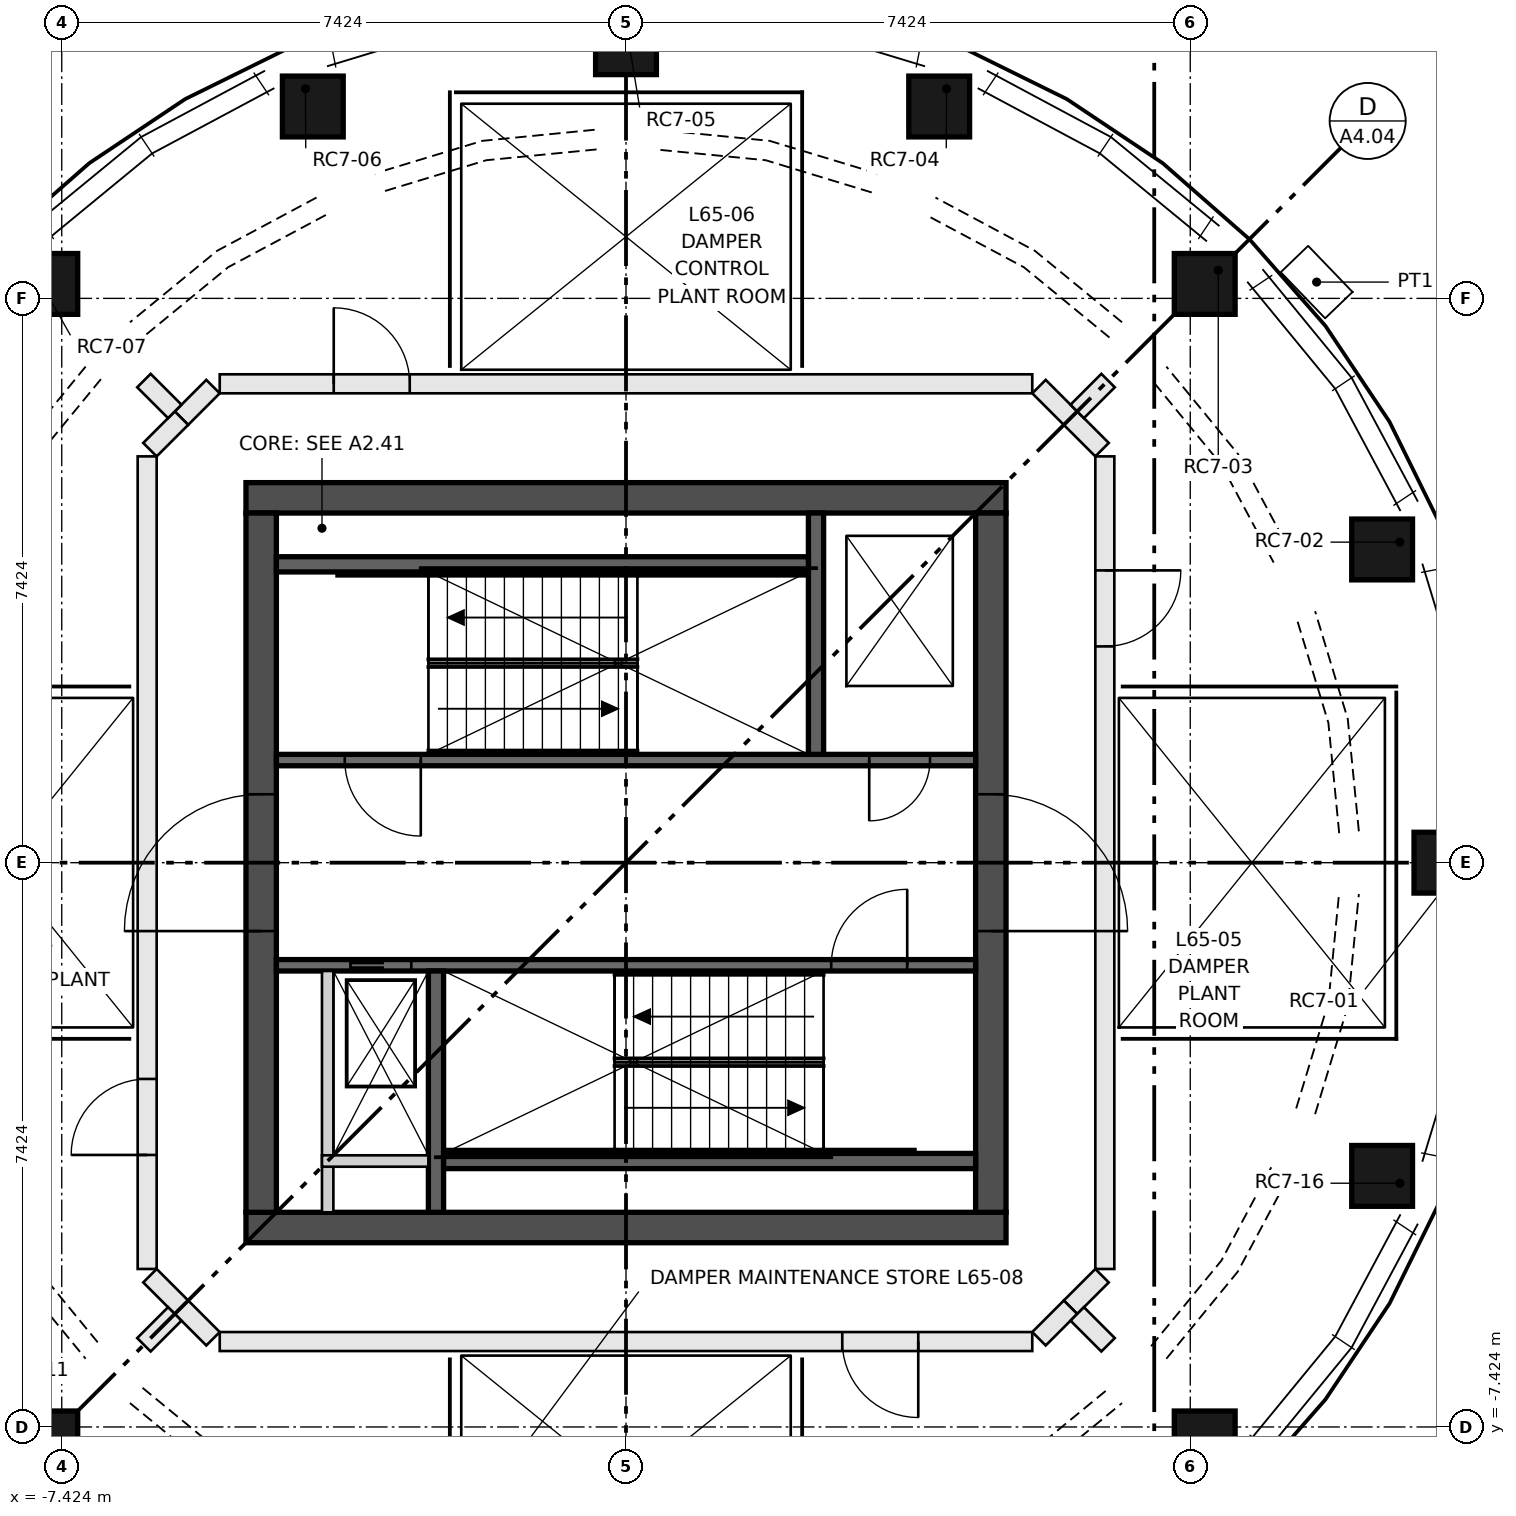
"""IFC4 building model, lengths in metres.
Left out: names, types, materials, properties, quantities, classifications, styles, units other than length and angle.
Written with IfcOpenShell. Run it as: python <this file> out.ifc"""

import sys

from ifc_helpers import new_model, si_unit, direction, frame, frame_2d, origin, origin_2d, place, context, subcontext, project, spatial, rectangle, extrude, element, fill, save


model = new_model("IFC4")
c1 = context("Model", 3, precision=1e-05, world=origin(), true_north=direction((0.0, 1.0)))
c2 = subcontext(c1, "Body", "Model", "MODEL_VIEW")
j1 = project(units=[si_unit("LENGTHUNIT", "METRE"), si_unit("PLANEANGLEUNIT", "RADIAN")], contexts=[c1])
p1 = place(None, origin())
s1 = spatial("IfcSite", under=j1, at=p1, CompositionType="ELEMENT")
p2 = place(p1, origin())
s2 = spatial("IfcBuilding", under=s1, at=p2, CompositionType="ELEMENT")
p3 = place(p2, frame((0.0, 0.0, 239.4)))
s3 = spatial("IfcBuildingStorey", under=s2, at=p3, CompositionType="ELEMENT", Elevation=239.4)
p4 = place(p3, frame((11.02, 0.0, 0.5), z_axis=(0.0, 0.0, 1.0), x_axis=(0.0, -1.0, 0.0)))
e1 = element("IfcColumn", 1, at=p4, inside=s3, PredefinedType="COLUMN", context=c2, shape_type="SweptSolid", body=[
    extrude(rectangle(XDim=0.8, YDim=0.8, at=origin_2d()), origin(), (0.0, -0.339, 0.941), 4.251),
])
p5 = place(p3, frame((10.181, 4.217, 0.5), z_axis=(0.0, 0.0, 1.0), x_axis=(0.382820947077, -0.923822560062, 0.0)))
e2 = element("IfcColumn", 2, at=p5, inside=s3, PredefinedType="COLUMN", context=c2, shape_type="SweptSolid", body=[
    extrude(rectangle(XDim=0.8, YDim=0.8, at=origin_2d()), origin(), (0.0, -0.339, 0.941), 4.251),
])
p6 = place(p3, frame((7.792, 7.792, 0.5), z_axis=(0.0, 0.0, 1.0), x_axis=(0.707106781187, -0.707106781187, 0.0)))
e3 = element("IfcColumn", 3, at=p6, inside=s3, PredefinedType="COLUMN", context=c2, shape_type="SweptSolid", body=[
    extrude(rectangle(XDim=0.8, YDim=0.8, at=origin_2d()), origin(), (0.0, -0.339, 0.941), 4.251),
])
p7 = place(p3, frame((4.217, 10.181, 0.5), z_axis=(0.0, 0.0, 1.0), x_axis=(0.923822560062, -0.382820947077, 0.0)))
e4 = element("IfcColumn", 4, at=p7, inside=s3, PredefinedType="COLUMN", context=c2, shape_type="SweptSolid", body=[
    extrude(rectangle(XDim=0.8, YDim=0.8, at=origin_2d()), origin(), (0.0, -0.339, 0.941), 4.251),
])
p8 = place(p3, frame((0.0, 11.02, 0.5), z_axis=(0.0, 0.0, 1.0), x_axis=(1.0, 0.0, 0.0)))
e5 = element("IfcColumn", 5, at=p8, inside=s3, PredefinedType="COLUMN", context=c2, shape_type="SweptSolid", body=[
    extrude(rectangle(XDim=0.8, YDim=0.8, at=origin_2d()), origin(), (0.0, -0.339, 0.941), 4.251),
])
p9 = place(p3, frame((-4.217, 10.181, 0.5), z_axis=(0.0, 0.0, 1.0), x_axis=(0.923822560062, 0.382820947077, 0.0)))
e6 = element("IfcColumn", 6, at=p9, inside=s3, PredefinedType="COLUMN", context=c2, shape_type="SweptSolid", body=[
    extrude(rectangle(XDim=0.8, YDim=0.8, at=origin_2d()), origin(), (0.0, -0.339, 0.941), 4.251),
])
for number, where, z_axis, x_axis in (
    (7, (-7.792, 7.792, 0.5), (0.0, 0.0, 1.0), (0.707, 0.707, 0.0)),
    (8, (-7.792, -7.792, 0.5), (0.0, 0.0, 1.0), (-0.707, 0.707, 0.0)),
    (9, (7.792, -7.792, 0.5), (0.0, 0.0, 1.0), (-0.707, -0.707, 0.0)),
):
    element("IfcColumn", number, at=place(p3, frame(where, z_axis=z_axis, x_axis=x_axis)), inside=s3, PredefinedType="COLUMN", context=c2, shape_type="SweptSolid", body=[
        extrude(rectangle(XDim=0.8, YDim=0.8, at=origin_2d()), origin(), (0.0, -0.339, 0.941), 4.251),
    ])
p10 = place(p3, frame((10.181, -4.217, 0.5), z_axis=(0.0, 0.0, 1.0), x_axis=(-0.382820947077, -0.923822560062, 0.0)))
e10 = element("IfcColumn", 10, at=p10, inside=s3, PredefinedType="COLUMN", context=c2, shape_type="SweptSolid", body=[
    extrude(rectangle(XDim=0.8, YDim=0.8, at=origin_2d()), origin(), (0.0, -0.339, 0.941), 4.251),
])
for number, where, z_axis, x_axis in (
    (11, (-5.0, -4.8, 0.0), (0.0, 0.0, 1.0), (1.0, 0.0, 0.0)),
    (12, (-5.0, 4.8, 0.0), (0.0, 0.0, 1.0), (1.0, 0.0, 0.0)),
):
    element("IfcWall", number, at=place(p3, frame(where, z_axis=z_axis, x_axis=x_axis)), inside=s3, PredefinedType="SHEAR", context=c2, shape_type="SweptSolid", body=[
        extrude(rectangle(XDim=10.0, YDim=0.4, at=frame_2d((5.0, 0.0))), origin(), (0.0, 0.0, 1.0), 4.65),
    ])
p11 = place(p3, frame((-4.8, -4.6, 0.0), z_axis=(0.0, 0.0, 1.0), x_axis=(0.0, 1.0, 0.0)))
e13 = element("IfcWall", 13, at=p11, inside=s3, PredefinedType="SHEAR", context=c2, shape_type="SweptSolid", body=[
    extrude(rectangle(XDim=9.2, YDim=0.4, at=frame_2d((4.6, 0.0))), origin(), (0.0, 0.0, 1.0), 4.65),
])
p12 = place(p11, frame((3.7, 0.0, 0.0)))
e14 = element("IfcOpeningElement", 14, at=p12, cuts=e13, PredefinedType="OPENING", context=c2, shape_type="SweptSolid", body=[
    extrude(rectangle(XDim=1.8, YDim=2.1, at=frame_2d((0.9, 1.05))), frame((0.0, 0.21, 0.0), z_axis=(0.0, -1.0, 0.0), x_axis=(1.0, 0.0, 0.0)), (0.0, 0.0, 1.0), 0.42),
])
p13 = place(p3, frame((4.8, -4.6, 0.0), z_axis=(0.0, 0.0, 1.0), x_axis=(0.0, 1.0, 0.0)))
e15 = element("IfcWall", 15, at=p13, inside=s3, PredefinedType="SHEAR", context=c2, shape_type="SweptSolid", body=[
    extrude(rectangle(XDim=9.2, YDim=0.4, at=frame_2d((4.6, 0.0))), origin(), (0.0, 0.0, 1.0), 4.65),
])
p14 = place(p13, frame((3.7, 0.0, 0.0)))
e16 = element("IfcOpeningElement", 16, at=p14, cuts=e15, PredefinedType="OPENING", context=c2, shape_type="SweptSolid", body=[
    extrude(rectangle(XDim=1.8, YDim=2.1, at=frame_2d((0.9, 1.05))), frame((0.0, 0.21, 0.0), z_axis=(0.0, -1.0, 0.0), x_axis=(1.0, 0.0, 0.0)), (0.0, 0.0, 1.0), 0.42),
])
p15 = place(p3, frame((-4.6, 1.35, 0.0), z_axis=(0.0, 0.0, 1.0), x_axis=(1.0, 0.0, 0.0)))
e17 = element("IfcWall", 17, at=p15, inside=s3, PredefinedType="SHEAR", context=c2, shape_type="SweptSolid", body=[
    extrude(rectangle(XDim=9.2, YDim=0.15, at=frame_2d((4.6, 0.0))), origin(), (0.0, 0.0, 1.0), 4.65),
])
p16 = place(p15, frame((0.9, 0.0, 0.0)))
e18 = element("IfcOpeningElement", 18, at=p16, cuts=e17, PredefinedType="OPENING", context=c2, shape_type="SweptSolid", body=[
    extrude(rectangle(XDim=1.0, YDim=2.1, at=frame_2d((0.5, 1.05))), frame((0.0, 0.085, 0.0), z_axis=(0.0, -1.0, 0.0), x_axis=(1.0, 0.0, 0.0)), (0.0, 0.0, 1.0), 0.17),
])
p17 = place(p15, frame((7.8, 0.0, 0.0)))
e19 = element("IfcOpeningElement", 19, at=p17, cuts=e17, PredefinedType="OPENING", context=c2, shape_type="SweptSolid", body=[
    extrude(rectangle(XDim=0.8, YDim=2.1, at=frame_2d((0.4, 1.05))), frame((0.0, 0.085, 0.0), z_axis=(0.0, -1.0, 0.0), x_axis=(1.0, 0.0, 0.0)), (0.0, 0.0, 1.0), 0.17),
])
p18 = place(p3, frame((-4.6, -1.35, 0.0), z_axis=(0.0, 0.0, 1.0), x_axis=(1.0, 0.0, 0.0)))
e20 = element("IfcWall", 20, at=p18, inside=s3, PredefinedType="SHEAR", context=c2, shape_type="SweptSolid", body=[
    extrude(rectangle(XDim=9.2, YDim=0.15, at=frame_2d((4.6, 0.0))), origin(), (0.0, 0.0, 1.0), 4.65),
])
p19 = place(p18, frame((0.975, 0.0, 0.0)))
e21 = element("IfcOpeningElement", 21, at=p19, cuts=e20, PredefinedType="OPENING", context=c2, shape_type="SweptSolid", body=[
    extrude(rectangle(XDim=0.8, YDim=2.1, at=frame_2d((0.4, 1.05))), frame((0.0, 0.085, 0.0), z_axis=(0.0, -1.0, 0.0), x_axis=(1.0, 0.0, 0.0)), (0.0, 0.0, 1.0), 0.17),
])
p20 = place(p18, frame((7.3, 0.0, 0.0)))
e22 = element("IfcOpeningElement", 22, at=p20, cuts=e20, PredefinedType="OPENING", context=c2, shape_type="SweptSolid", body=[
    extrude(rectangle(XDim=1.0, YDim=2.1, at=frame_2d((0.5, 1.05))), frame((0.0, 0.085, 0.0), z_axis=(0.0, -1.0, 0.0), x_axis=(1.0, 0.0, 0.0)), (0.0, 0.0, 1.0), 0.17),
])
for number, where, z_axis, x_axis in (
    (23, (2.5, 1.425, 0.0), (0.0, 0.0, 1.0), (0.0, 1.0, 0.0)),
    (24, (-2.5, -1.425, 0.0), (0.0, 0.0, 1.0), (0.0, -1.0, 0.0)),
):
    element("IfcWall", number, at=place(p3, frame(where, z_axis=z_axis, x_axis=x_axis)), inside=s3, PredefinedType="SHEAR", context=c2, shape_type="SweptSolid", body=[
        extrude(rectangle(XDim=3.175, YDim=0.2, at=frame_2d((1.587, 0.0))), origin(), (0.0, 0.0, 1.0), 4.65),
    ])
for number, where, z_axis, x_axis in (
    (25, (-4.6, 3.925, 0.0), (0.0, 0.0, 1.0), (1.0, 0.0, 0.0)),
    (26, (4.6, -3.925, 0.0), (0.0, 0.0, 1.0), (-1.0, 0.0, 0.0)),
):
    element("IfcWall", number, at=place(p3, frame(where, z_axis=z_axis, x_axis=x_axis)), inside=s3, PredefinedType="SHEAR", context=c2, shape_type="SweptSolid", body=[
        extrude(rectangle(XDim=7.0, YDim=0.2, at=frame_2d((3.5, 0.0))), origin(), (0.0, 0.0, 1.0), 4.65),
    ])
p21 = place(p3, frame((-3.925, -4.6, 0.0), z_axis=(0.0, 0.0, 1.0), x_axis=(0.0, 1.0, 0.0)))
e27 = element("IfcWall", 27, at=p21, inside=s3, PredefinedType="PARTITIONING", context=c2, shape_type="SweptSolid", body=[
    extrude(rectangle(XDim=3.175, YDim=0.15, at=frame_2d((1.587, 0.0))), origin(), (0.0, 0.0, 1.0), 4.65),
])
p22 = place(p3, frame((-4.0, -3.925, 0.0), z_axis=(0.0, 0.0, 1.0), x_axis=(1.0, 0.0, 0.0)))
e28 = element("IfcWall", 28, at=p22, inside=s3, PredefinedType="PARTITIONING", context=c2, shape_type="SweptSolid", body=[
    extrude(rectangle(XDim=1.4, YDim=0.15, at=frame_2d((0.7, 0.0))), origin(), (0.0, 0.0, 1.0), 4.65),
])
for number, where, z_axis, x_axis in (
    (29, (5.848, 5.848, 0.0), (0.0, 0.0, 1.0), (0.707, -0.707, 0.0)),
    (30, (6.263, -5.434, 0.0), (0.0, 0.0, 1.0), (-0.707, -0.707, 0.0)),
):
    element("IfcWall", number, at=place(p3, frame(where, z_axis=z_axis, x_axis=x_axis)), inside=s3, PredefinedType="PARTITIONING", context=c2, shape_type="SweptSolid", body=[
        extrude(rectangle(XDim=0.587, YDim=0.25, at=frame_2d((0.293, 0.0))), origin(), (0.0, 0.0, 1.0), 4.65),
    ])
p23 = place(p3, frame((6.3, 5.345, 0.0), z_axis=(0.0, 0.0, 1.0), x_axis=(0.0, -1.0, 0.0)))
e31 = element("IfcWall", 31, at=p23, inside=s3, PredefinedType="PARTITIONING", context=c2, shape_type="SweptSolid", body=[
    extrude(rectangle(XDim=10.69, YDim=0.25, at=frame_2d((5.345, 0.0))), origin(), (0.0, 0.0, 1.0), 4.65),
])
p24 = place(p23, frame((1.5, 0.0, 0.0)))
e32 = element("IfcOpeningElement", 32, at=p24, cuts=e31, PredefinedType="OPENING", context=c2, shape_type="SweptSolid", body=[
    extrude(rectangle(XDim=1.0, YDim=2.1, at=frame_2d((0.5, 1.05))), frame((0.0, 0.135, 0.0), z_axis=(0.0, -1.0, 0.0), x_axis=(1.0, 0.0, 0.0)), (0.0, 0.0, 1.0), 0.27),
])
p25 = place(p3, frame((-5.848, 5.848, 0.0), z_axis=(0.0, 0.0, 1.0), x_axis=(0.706898716824, 0.707314784344, 0.0)))
e33 = element("IfcWall", 33, at=p25, inside=s3, PredefinedType="PARTITIONING", context=c2, shape_type="SweptSolid", body=[
    extrude(rectangle(XDim=0.587, YDim=0.25, at=frame_2d((0.293, 0.0))), origin(), (0.0, 0.0, 1.0), 4.65),
])
p26 = place(p3, frame((-5.345, 6.3, 0.0), z_axis=(0.0, 0.0, 1.0), x_axis=(1.0, 0.0, 0.0)))
e34 = element("IfcWall", 34, at=p26, inside=s3, PredefinedType="PARTITIONING", context=c2, shape_type="SweptSolid", body=[
    extrude(rectangle(XDim=10.69, YDim=0.25, at=frame_2d((5.345, 0.0))), origin(), (0.0, 0.0, 1.0), 4.65),
])
p27 = place(p26, frame((1.5, 0.0, 0.0)))
e35 = element("IfcOpeningElement", 35, at=p27, cuts=e34, PredefinedType="OPENING", context=c2, shape_type="SweptSolid", body=[
    extrude(rectangle(XDim=1.0, YDim=2.1, at=frame_2d((0.5, 1.05))), frame((0.0, 0.135, 0.0), z_axis=(0.0, -1.0, 0.0), x_axis=(1.0, 0.0, 0.0)), (0.0, 0.0, 1.0), 0.27),
])
p28 = place(p3, frame((5.434, 6.263, 0.0), z_axis=(0.0, 0.0, 1.0), x_axis=(0.706898716824, -0.707314784344, 0.0)))
e36 = element("IfcWall", 36, at=p28, inside=s3, PredefinedType="PARTITIONING", context=c2, shape_type="SweptSolid", body=[
    extrude(rectangle(XDim=0.587, YDim=0.25, at=frame_2d((0.293, 0.0))), origin(), (0.0, 0.0, 1.0), 4.65),
])
p29 = place(p3, frame((-6.3, -5.345, 0.0), z_axis=(0.0, 0.0, 1.0), x_axis=(0.0, 1.0, 0.0)))
e37 = element("IfcWall", 37, at=p29, inside=s3, PredefinedType="PARTITIONING", context=c2, shape_type="SweptSolid", body=[
    extrude(rectangle(XDim=10.69, YDim=0.25, at=frame_2d((5.345, 0.0))), origin(), (0.0, 0.0, 1.0), 4.65),
])
p30 = place(p29, frame((1.5, 0.0, 0.0)))
e38 = element("IfcOpeningElement", 38, at=p30, cuts=e37, PredefinedType="OPENING", context=c2, shape_type="SweptSolid", body=[
    extrude(rectangle(XDim=1.0, YDim=2.1, at=frame_2d((0.5, 1.05))), frame((0.0, 0.135, 0.0), z_axis=(0.0, -1.0, 0.0), x_axis=(1.0, 0.0, 0.0)), (0.0, 0.0, 1.0), 0.27),
])
for number, where, z_axis, x_axis in (
    (39, (-6.263, 5.434, 0.0), (0.0, 0.0, 1.0), (0.707, 0.707, 0.0)),
    (40, (-5.848, -5.848, 0.0), (0.0, 0.0, 1.0), (-0.707, 0.707, 0.0)),
    (41, (-5.434, -6.263, 0.0), (0.0, 0.0, 1.0), (-0.707, 0.707, 0.0)),
):
    element("IfcWall", number, at=place(p3, frame(where, z_axis=z_axis, x_axis=x_axis)), inside=s3, PredefinedType="PARTITIONING", context=c2, shape_type="SweptSolid", body=[
        extrude(rectangle(XDim=0.587, YDim=0.25, at=frame_2d((0.293, 0.0))), origin(), (0.0, 0.0, 1.0), 4.65),
    ])
p31 = place(p3, frame((5.345, -6.3, 0.0), z_axis=(0.0, 0.0, 1.0), x_axis=(-1.0, 0.0, 0.0)))
e42 = element("IfcWall", 42, at=p31, inside=s3, PredefinedType="PARTITIONING", context=c2, shape_type="SweptSolid", body=[
    extrude(rectangle(XDim=10.69, YDim=0.25, at=frame_2d((5.345, 0.0))), origin(), (0.0, 0.0, 1.0), 4.65),
])
p32 = place(p31, frame((1.5, 0.0, 0.0)))
e43 = element("IfcOpeningElement", 43, at=p32, cuts=e42, PredefinedType="OPENING", context=c2, shape_type="SweptSolid", body=[
    extrude(rectangle(XDim=1.0, YDim=2.1, at=frame_2d((0.5, 1.05))), frame((0.0, 0.135, 0.0), z_axis=(0.0, -1.0, 0.0), x_axis=(1.0, 0.0, 0.0)), (0.0, 0.0, 1.0), 0.27),
])
p33 = place(p3, frame((5.848, -5.848, 0.0), z_axis=(0.0, 0.0, 1.0), x_axis=(-0.706898716824, -0.707314784344, 0.0)))
e44 = element("IfcWall", 44, at=p33, inside=s3, PredefinedType="PARTITIONING", context=c2, shape_type="SweptSolid", body=[
    extrude(rectangle(XDim=0.587, YDim=0.25, at=frame_2d((0.293, 0.0))), origin(), (0.0, 0.0, 1.0), 4.65),
])
for number, where, z_axis, x_axis in (
    (45, (5.937, 5.937, 0.0), (0.0, 0.0, 1.0), (0.707, 0.707, 0.0)),
    (46, (6.343, -6.343, 0.0), (0.0, 0.0, 1.0), (-0.707, 0.707, 0.0)),
    (47, (-5.937, 5.937, 0.0), (0.0, 0.0, 1.0), (-0.707, 0.707, 0.0)),
    (48, (-5.937, -5.937, 0.0), (0.0, 0.0, 1.0), (-0.707, -0.707, 0.0)),
):
    element("IfcWall", number, at=place(p3, frame(where, z_axis=z_axis, x_axis=x_axis)), inside=s3, PredefinedType="PARTITIONING", context=c2, shape_type="SweptSolid", body=[
        extrude(rectangle(XDim=0.574, YDim=0.25, at=frame_2d((0.287, 0.0))), origin(), (0.0, 0.0, 1.0), 4.65),
    ])
p34 = place(p19, origin())
e49 = element("IfcDoor", 49, at=p34, inside=s3, OperationType="DOUBLE_DOOR_SLIDING", PredefinedType="DOOR", context=c2, shape_type="SweptSolid", body=[
    extrude(rectangle(XDim=0.8, YDim=2.1, at=frame_2d((0.4, 1.05))), frame((0.0, 0.025, 0.0), z_axis=(0.0, -1.0, 0.0), x_axis=(1.0, 0.0, 0.0)), (0.0, 0.0, 1.0), 0.05),
])
fill(e21, e49)
p35 = place(p16, frame((1.0, 0.0, 0.0), z_axis=(0.0, 0.0, 1.0), x_axis=(-1.0, 0.0, 0.0)))
e50 = element("IfcDoor", 50, at=p35, inside=s3, OperationType="SINGLE_SWING_RIGHT", PredefinedType="DOOR", context=c2, shape_type="SweptSolid", body=[
    extrude(rectangle(XDim=1.0, YDim=2.1, at=frame_2d((0.5, 1.05))), frame((0.0, 0.025, 0.0), z_axis=(0.0, -1.0, 0.0), x_axis=(1.0, 0.0, 0.0)), (0.0, 0.0, 1.0), 0.05),
])
fill(e18, e50)
p36 = place(p20, origin())
e51 = element("IfcDoor", 51, at=p36, inside=s3, OperationType="SINGLE_SWING_RIGHT", PredefinedType="DOOR", context=c2, shape_type="SweptSolid", body=[
    extrude(rectangle(XDim=1.0, YDim=2.1, at=frame_2d((0.5, 1.05))), frame((0.0, 0.025, 0.0), z_axis=(0.0, -1.0, 0.0), x_axis=(1.0, 0.0, 0.0)), (0.0, 0.0, 1.0), 0.05),
])
fill(e22, e51)
p37 = place(p17, frame((0.8, 0.0, 0.0), z_axis=(0.0, 0.0, 1.0), x_axis=(-1.0, 0.0, 0.0)))
e52 = element("IfcDoor", 52, at=p37, inside=s3, OperationType="SINGLE_SWING_LEFT", PredefinedType="DOOR", context=c2, shape_type="SweptSolid", body=[
    extrude(rectangle(XDim=0.8, YDim=2.1, at=frame_2d((0.4, 1.05))), frame((0.0, 0.025, 0.0), z_axis=(0.0, -1.0, 0.0), x_axis=(1.0, 0.0, 0.0)), (0.0, 0.0, 1.0), 0.05),
])
fill(e19, e52)
p38 = place(p12, origin())
e53 = element("IfcDoor", 53, at=p38, inside=s3, OperationType="DOUBLE_DOOR_SINGLE_SWING", PredefinedType="DOOR", context=c2, shape_type="SweptSolid", body=[
    extrude(rectangle(XDim=1.8, YDim=2.1, at=frame_2d((0.9, 1.05))), frame((0.0, 0.025, 0.0), z_axis=(0.0, -1.0, 0.0), x_axis=(1.0, 0.0, 0.0)), (0.0, 0.0, 1.0), 0.05),
])
fill(e14, e53)
p39 = place(p14, frame((1.8, 0.0, 0.0), z_axis=(0.0, 0.0, 1.0), x_axis=(-1.0, 0.0, 0.0)))
e54 = element("IfcDoor", 54, at=p39, inside=s3, OperationType="DOUBLE_DOOR_SINGLE_SWING", PredefinedType="DOOR", context=c2, shape_type="SweptSolid", body=[
    extrude(rectangle(XDim=1.8, YDim=2.1, at=frame_2d((0.9, 1.05))), frame((0.0, 0.025, 0.0), z_axis=(0.0, -1.0, 0.0), x_axis=(1.0, 0.0, 0.0)), (0.0, 0.0, 1.0), 0.05),
])
fill(e16, e54)
p40 = place(p24, origin())
e55 = element("IfcDoor", 55, at=p40, inside=s3, OperationType="SINGLE_SWING_LEFT", PredefinedType="DOOR", context=c2, shape_type="SweptSolid", body=[
    extrude(rectangle(XDim=1.0, YDim=2.1, at=frame_2d((0.5, 1.05))), frame((0.0, 0.025, 0.0), z_axis=(0.0, -1.0, 0.0), x_axis=(1.0, 0.0, 0.0)), (0.0, 0.0, 1.0), 0.05),
])
fill(e32, e55)
p41 = place(p27, origin())
e56 = element("IfcDoor", 56, at=p41, inside=s3, OperationType="SINGLE_SWING_LEFT", PredefinedType="DOOR", context=c2, shape_type="SweptSolid", body=[
    extrude(rectangle(XDim=1.0, YDim=2.1, at=frame_2d((0.5, 1.05))), frame((0.0, 0.025, 0.0), z_axis=(0.0, -1.0, 0.0), x_axis=(1.0, 0.0, 0.0)), (0.0, 0.0, 1.0), 0.05),
])
fill(e35, e56)
p42 = place(p30, origin())
e57 = element("IfcDoor", 57, at=p42, inside=s3, OperationType="SINGLE_SWING_LEFT", PredefinedType="DOOR", context=c2, shape_type="SweptSolid", body=[
    extrude(rectangle(XDim=1.0, YDim=2.1, at=frame_2d((0.5, 1.05))), frame((0.0, 0.025, 0.0), z_axis=(0.0, -1.0, 0.0), x_axis=(1.0, 0.0, 0.0)), (0.0, 0.0, 1.0), 0.05),
])
fill(e38, e57)
p43 = place(p32, origin())
e58 = element("IfcDoor", 58, at=p43, inside=s3, OperationType="SINGLE_SWING_LEFT", PredefinedType="DOOR", context=c2, shape_type="SweptSolid", body=[
    extrude(rectangle(XDim=1.0, YDim=2.1, at=frame_2d((0.5, 1.05))), frame((0.0, 0.025, 0.0), z_axis=(0.0, -1.0, 0.0), x_axis=(1.0, 0.0, 0.0)), (0.0, 0.0, 1.0), 0.05),
])
fill(e43, e58)
save(model, sys.argv[1])
